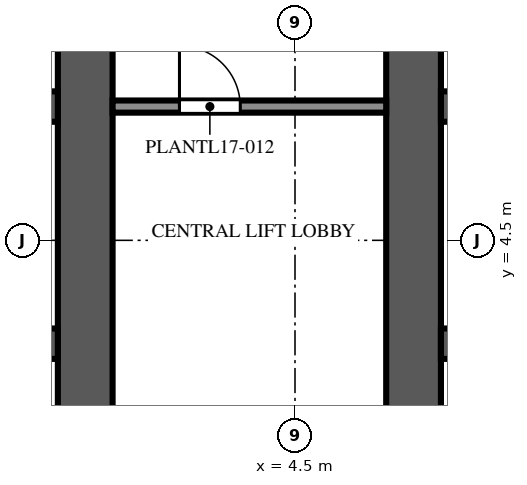
"""IFC4 building model, lengths in metres.
Left out: names, types, materials, properties, quantities, classifications, styles, units other than length and angle.
Written with IfcOpenShell. Run it as: python <this file> out.ifc"""

import sys

from ifc_helpers import new_model, si_unit, direction, frame, frame_2d, origin, place, context, subcontext, project, spatial, rectangle, extrude, element, fill, save


model = new_model("IFC4")
c1 = context("Model", 3, precision=1e-05, world=origin(), true_north=direction((0.0, 1.0)))
c2 = subcontext(c1, "Body", "Model", "MODEL_VIEW")
j1 = project(units=[si_unit("LENGTHUNIT", "METRE"), si_unit("PLANEANGLEUNIT", "RADIAN")], contexts=[c1])
p1 = place(None, origin())
s1 = spatial("IfcSite", under=j1, at=p1, CompositionType="ELEMENT")
p2 = place(p1, origin())
s2 = spatial("IfcBuilding", under=s1, at=p2, CompositionType="ELEMENT")
p3 = place(p2, frame((0.0, 0.0, 76.6)))
s3 = spatial("IfcBuildingStorey", under=s2, at=p3, CompositionType="ELEMENT", Elevation=76.6)
p4 = place(p3, frame((1.05, -9.0, 0.0), z_axis=(0.0, 0.0, 1.0), x_axis=(0.0, 1.0, 0.0)))
e1 = element("IfcWall", 1, at=p4, inside=s3, PredefinedType="SHEAR", context=c2, shape_type="SweptSolid", body=[
    extrude(rectangle(XDim=27.5, YDim=0.9, at=frame_2d((13.75, 0.0))), origin(), (0.0, 0.0, 1.0), 5.4),
])
p5 = place(p4, frame((12.55, 0.0, 0.0)))
e2 = element("IfcOpeningElement", 2, at=p5, cuts=e1, PredefinedType="OPENING", context=c2, shape_type="SweptSolid", body=[
    extrude(rectangle(XDim=2.4, YDim=2.4, at=frame_2d((1.2, 1.2))), frame((0.0, 0.46, 0.0), z_axis=(0.0, -1.0, 0.0), x_axis=(1.0, 0.0, 0.0)), (0.0, 0.0, 1.0), 0.92),
])
p6 = place(p4, frame((5.445, 0.0, 0.0)))
e3 = element("IfcOpeningElement", 3, at=p6, cuts=e1, PredefinedType="OPENING", context=c2, shape_type="SweptSolid", body=[
    extrude(rectangle(XDim=1.2, YDim=2.1, at=frame_2d((0.6, 1.05))), frame((0.0, 0.46, 0.0), z_axis=(0.0, -1.0, 0.0), x_axis=(1.0, 0.0, 0.0)), (0.0, 0.0, 1.0), 0.92),
])
p7 = place(p4, frame((19.485, 0.0, 0.0)))
e4 = element("IfcOpeningElement", 4, at=p7, cuts=e1, PredefinedType="OPENING", context=c2, shape_type="SweptSolid", body=[
    extrude(rectangle(XDim=1.0, YDim=2.1, at=frame_2d((0.5, 1.05))), frame((0.0, 0.46, 0.0), z_axis=(0.0, -1.0, 0.0), x_axis=(1.0, 0.0, 0.0)), (0.0, 0.0, 1.0), 0.92),
])
p8 = place(p4, frame((21.139, 0.0, 0.0)))
e5 = element("IfcOpeningElement", 5, at=p8, cuts=e1, PredefinedType="OPENING", context=c2, shape_type="SweptSolid", body=[
    extrude(rectangle(XDim=1.0, YDim=2.1, at=frame_2d((0.5, 1.05))), frame((0.0, 0.46, 0.0), z_axis=(0.0, -1.0, 0.0), x_axis=(1.0, 0.0, 0.0)), (0.0, 0.0, 1.0), 0.92),
])
p9 = place(p4, frame((23.16, 0.0, 0.0)))
e6 = element("IfcOpeningElement", 6, at=p9, cuts=e1, PredefinedType="OPENING", context=c2, shape_type="SweptSolid", body=[
    extrude(rectangle(XDim=1.0, YDim=2.1, at=frame_2d((0.5, 1.05))), frame((0.0, 0.46, 0.0), z_axis=(0.0, -1.0, 0.0), x_axis=(1.0, 0.0, 0.0)), (0.0, 0.0, 1.0), 0.92),
])
p10 = place(p4, frame((25.181, 0.0, 0.0)))
e7 = element("IfcOpeningElement", 7, at=p10, cuts=e1, PredefinedType="OPENING", context=c2, shape_type="SweptSolid", body=[
    extrude(rectangle(XDim=1.0, YDim=2.1, at=frame_2d((0.5, 1.05))), frame((0.0, 0.46, 0.0), z_axis=(0.0, -1.0, 0.0), x_axis=(1.0, 0.0, 0.0)), (0.0, 0.0, 1.0), 0.92),
])
p11 = place(p3, frame((-9.6, 2.8, 0.0), z_axis=(0.0, 0.0, 1.0), x_axis=(1.0, 0.0, 0.0)))
e8 = element("IfcWall", 8, at=p11, inside=s3, PredefinedType="SHEAR", context=c2, shape_type="SweptSolid", body=[
    extrude(rectangle(XDim=10.2, YDim=0.5, at=frame_2d((5.1, 0.0))), origin(), (0.0, 0.0, 1.0), 5.4),
])
p12 = place(p11, frame((0.562, 0.0, 0.0)))
e9 = element("IfcOpeningElement", 9, at=p12, cuts=e8, PredefinedType="OPENING", context=c2, shape_type="SweptSolid", body=[
    extrude(rectangle(XDim=1.1, YDim=2.1, at=frame_2d((0.55, 1.05))), frame((0.0, 0.26, 0.0), z_axis=(0.0, -1.0, 0.0), x_axis=(1.0, 0.0, 0.0)), (0.0, 0.0, 1.0), 0.52),
])
p13 = place(p11, frame((3.238, 0.0, 0.0)))
e10 = element("IfcOpeningElement", 10, at=p13, cuts=e8, PredefinedType="OPENING", context=c2, shape_type="SweptSolid", body=[
    extrude(rectangle(XDim=1.1, YDim=2.1, at=frame_2d((0.55, 1.05))), frame((0.0, 0.26, 0.0), z_axis=(0.0, -1.0, 0.0), x_axis=(1.0, 0.0, 0.0)), (0.0, 0.0, 1.0), 0.52),
])
p14 = place(p11, frame((8.538, 0.0, 0.0)))
e11 = element("IfcOpeningElement", 11, at=p14, cuts=e8, PredefinedType="OPENING", context=c2, shape_type="SweptSolid", body=[
    extrude(rectangle(XDim=1.1, YDim=2.1, at=frame_2d((0.55, 1.05))), frame((0.0, 0.26, 0.0), z_axis=(0.0, -1.0, 0.0), x_axis=(1.0, 0.0, 0.0)), (0.0, 0.0, 1.0), 0.52),
])
p15 = place(p3, frame((-9.6, 6.7, 0.0), z_axis=(0.0, 0.0, 1.0), x_axis=(1.0, 0.0, 0.0)))
e12 = element("IfcWall", 12, at=p15, inside=s3, PredefinedType="SHEAR", context=c2, shape_type="SweptSolid", body=[
    extrude(rectangle(XDim=10.2, YDim=0.5, at=frame_2d((5.1, 0.0))), origin(), (0.0, 0.0, 1.0), 5.4),
])
p16 = place(p15, frame((0.562, 0.0, 0.0)))
e13 = element("IfcOpeningElement", 13, at=p16, cuts=e12, PredefinedType="OPENING", context=c2, shape_type="SweptSolid", body=[
    extrude(rectangle(XDim=1.1, YDim=2.1, at=frame_2d((0.55, 1.05))), frame((0.0, 0.26, 0.0), z_axis=(0.0, -1.0, 0.0), x_axis=(1.0, 0.0, 0.0)), (0.0, 0.0, 1.0), 0.52),
])
p17 = place(p15, frame((3.288, 0.0, 0.0)))
e14 = element("IfcOpeningElement", 14, at=p17, cuts=e12, PredefinedType="OPENING", context=c2, shape_type="SweptSolid", body=[
    extrude(rectangle(XDim=1.0, YDim=2.1, at=frame_2d((0.5, 1.05))), frame((0.0, 0.26, 0.0), z_axis=(0.0, -1.0, 0.0), x_axis=(1.0, 0.0, 0.0)), (0.0, 0.0, 1.0), 0.52),
])
p18 = place(p15, frame((5.913, 0.0, 0.0)))
e15 = element("IfcOpeningElement", 15, at=p18, cuts=e12, PredefinedType="OPENING", context=c2, shape_type="SweptSolid", body=[
    extrude(rectangle(XDim=1.0, YDim=2.1, at=frame_2d((0.5, 1.05))), frame((0.0, 0.26, 0.0), z_axis=(0.0, -1.0, 0.0), x_axis=(1.0, 0.0, 0.0)), (0.0, 0.0, 1.0), 0.52),
])
p19 = place(p15, frame((8.587, 0.0, 0.0)))
e16 = element("IfcOpeningElement", 16, at=p19, cuts=e12, PredefinedType="OPENING", context=c2, shape_type="SweptSolid", body=[
    extrude(rectangle(XDim=1.0, YDim=2.1, at=frame_2d((0.5, 1.05))), frame((0.0, 0.26, 0.0), z_axis=(0.0, -1.0, 0.0), x_axis=(1.0, 0.0, 0.0)), (0.0, 0.0, 1.0), 0.52),
])
p20 = place(p3, frame((6.45, -9.0, 0.0), z_axis=(0.0, 0.0, 1.0), x_axis=(0.0, 1.0, 0.0)))
e17 = element("IfcWall", 17, at=p20, inside=s3, PredefinedType="SHEAR", context=c2, shape_type="SweptSolid", body=[
    extrude(rectangle(XDim=27.5, YDim=0.9, at=frame_2d((13.75, 0.0))), origin(), (0.0, 0.0, 1.0), 5.4),
])
p21 = place(p20, frame((12.55, 0.0, 0.0)))
e18 = element("IfcOpeningElement", 18, at=p21, cuts=e17, PredefinedType="OPENING", context=c2, shape_type="SweptSolid", body=[
    extrude(rectangle(XDim=2.4, YDim=2.4, at=frame_2d((1.2, 1.2))), frame((0.0, 0.46, 0.0), z_axis=(0.0, -1.0, 0.0), x_axis=(1.0, 0.0, 0.0)), (0.0, 0.0, 1.0), 0.92),
])
p22 = place(p20, frame((5.445, 0.0, 0.0)))
e19 = element("IfcOpeningElement", 19, at=p22, cuts=e17, PredefinedType="OPENING", context=c2, shape_type="SweptSolid", body=[
    extrude(rectangle(XDim=1.2, YDim=2.1, at=frame_2d((0.6, 1.05))), frame((0.0, 0.46, 0.0), z_axis=(0.0, -1.0, 0.0), x_axis=(1.0, 0.0, 0.0)), (0.0, 0.0, 1.0), 0.92),
])
p23 = place(p20, frame((19.485, 0.0, 0.0)))
e20 = element("IfcOpeningElement", 20, at=p23, cuts=e17, PredefinedType="OPENING", context=c2, shape_type="SweptSolid", body=[
    extrude(rectangle(XDim=1.0, YDim=2.1, at=frame_2d((0.5, 1.05))), frame((0.0, 0.46, 0.0), z_axis=(0.0, -1.0, 0.0), x_axis=(1.0, 0.0, 0.0)), (0.0, 0.0, 1.0), 0.92),
])
p24 = place(p20, frame((21.139, 0.0, 0.0)))
e21 = element("IfcOpeningElement", 21, at=p24, cuts=e17, PredefinedType="OPENING", context=c2, shape_type="SweptSolid", body=[
    extrude(rectangle(XDim=1.0, YDim=2.1, at=frame_2d((0.5, 1.05))), frame((0.0, 0.46, 0.0), z_axis=(0.0, -1.0, 0.0), x_axis=(1.0, 0.0, 0.0)), (0.0, 0.0, 1.0), 0.92),
])
p25 = place(p20, frame((23.16, 0.0, 0.0)))
e22 = element("IfcOpeningElement", 22, at=p25, cuts=e17, PredefinedType="OPENING", context=c2, shape_type="SweptSolid", body=[
    extrude(rectangle(XDim=1.0, YDim=2.1, at=frame_2d((0.5, 1.05))), frame((0.0, 0.46, 0.0), z_axis=(0.0, -1.0, 0.0), x_axis=(1.0, 0.0, 0.0)), (0.0, 0.0, 1.0), 0.92),
])
p26 = place(p20, frame((25.181, 0.0, 0.0)))
e23 = element("IfcOpeningElement", 23, at=p26, cuts=e17, PredefinedType="OPENING", context=c2, shape_type="SweptSolid", body=[
    extrude(rectangle(XDim=1.0, YDim=2.1, at=frame_2d((0.5, 1.05))), frame((0.0, 0.46, 0.0), z_axis=(0.0, -1.0, 0.0), x_axis=(1.0, 0.0, 0.0)), (0.0, 0.0, 1.0), 0.92),
])
p27 = place(p3, frame((6.9, 2.8, 0.0), z_axis=(0.0, 0.0, 1.0), x_axis=(1.0, 0.0, 0.0)))
e24 = element("IfcWall", 24, at=p27, inside=s3, PredefinedType="SHEAR", context=c2, shape_type="SweptSolid", body=[
    extrude(rectangle(XDim=10.2, YDim=0.5, at=frame_2d((5.1, 0.0))), origin(), (0.0, 0.0, 1.0), 5.4),
])
p28 = place(p27, frame((0.562, 0.0, 0.0)))
e25 = element("IfcOpeningElement", 25, at=p28, cuts=e24, PredefinedType="OPENING", context=c2, shape_type="SweptSolid", body=[
    extrude(rectangle(XDim=1.1, YDim=2.1, at=frame_2d((0.55, 1.05))), frame((0.0, 0.26, 0.0), z_axis=(0.0, -1.0, 0.0), x_axis=(1.0, 0.0, 0.0)), (0.0, 0.0, 1.0), 0.52),
])
p29 = place(p27, frame((3.238, 0.0, 0.0)))
e26 = element("IfcOpeningElement", 26, at=p29, cuts=e24, PredefinedType="OPENING", context=c2, shape_type="SweptSolid", body=[
    extrude(rectangle(XDim=1.1, YDim=2.1, at=frame_2d((0.55, 1.05))), frame((0.0, 0.26, 0.0), z_axis=(0.0, -1.0, 0.0), x_axis=(1.0, 0.0, 0.0)), (0.0, 0.0, 1.0), 0.52),
])
p30 = place(p27, frame((8.538, 0.0, 0.0)))
e27 = element("IfcOpeningElement", 27, at=p30, cuts=e24, PredefinedType="OPENING", context=c2, shape_type="SweptSolid", body=[
    extrude(rectangle(XDim=1.1, YDim=2.1, at=frame_2d((0.55, 1.05))), frame((0.0, 0.26, 0.0), z_axis=(0.0, -1.0, 0.0), x_axis=(1.0, 0.0, 0.0)), (0.0, 0.0, 1.0), 0.52),
])
p31 = place(p3, frame((6.9, 6.7, 0.0), z_axis=(0.0, 0.0, 1.0), x_axis=(1.0, 0.0, 0.0)))
e28 = element("IfcWall", 28, at=p31, inside=s3, PredefinedType="SHEAR", context=c2, shape_type="SweptSolid", body=[
    extrude(rectangle(XDim=10.2, YDim=0.5, at=frame_2d((5.1, 0.0))), origin(), (0.0, 0.0, 1.0), 5.4),
])
p32 = place(p31, frame((0.562, 0.0, 0.0)))
e29 = element("IfcOpeningElement", 29, at=p32, cuts=e28, PredefinedType="OPENING", context=c2, shape_type="SweptSolid", body=[
    extrude(rectangle(XDim=1.1, YDim=2.1, at=frame_2d((0.55, 1.05))), frame((0.0, 0.26, 0.0), z_axis=(0.0, -1.0, 0.0), x_axis=(1.0, 0.0, 0.0)), (0.0, 0.0, 1.0), 0.52),
])
p33 = place(p31, frame((3.288, 0.0, 0.0)))
e30 = element("IfcOpeningElement", 30, at=p33, cuts=e28, PredefinedType="OPENING", context=c2, shape_type="SweptSolid", body=[
    extrude(rectangle(XDim=1.0, YDim=2.1, at=frame_2d((0.5, 1.05))), frame((0.0, 0.26, 0.0), z_axis=(0.0, -1.0, 0.0), x_axis=(1.0, 0.0, 0.0)), (0.0, 0.0, 1.0), 0.52),
])
p34 = place(p31, frame((5.913, 0.0, 0.0)))
e31 = element("IfcOpeningElement", 31, at=p34, cuts=e28, PredefinedType="OPENING", context=c2, shape_type="SweptSolid", body=[
    extrude(rectangle(XDim=1.0, YDim=2.1, at=frame_2d((0.5, 1.05))), frame((0.0, 0.26, 0.0), z_axis=(0.0, -1.0, 0.0), x_axis=(1.0, 0.0, 0.0)), (0.0, 0.0, 1.0), 0.52),
])
p35 = place(p31, frame((8.587, 0.0, 0.0)))
e32 = element("IfcOpeningElement", 32, at=p35, cuts=e28, PredefinedType="OPENING", context=c2, shape_type="SweptSolid", body=[
    extrude(rectangle(XDim=1.0, YDim=2.1, at=frame_2d((0.5, 1.05))), frame((0.0, 0.26, 0.0), z_axis=(0.0, -1.0, 0.0), x_axis=(1.0, 0.0, 0.0)), (0.0, 0.0, 1.0), 0.52),
])
p36 = place(p3, frame((1.5, 6.7, 0.0), z_axis=(0.0, 0.0, 1.0), x_axis=(1.0, 0.0, 0.0)))
e33 = element("IfcWall", 33, at=p36, inside=s3, PredefinedType="PARTITIONING", context=c2, shape_type="SweptSolid", body=[
    extrude(rectangle(XDim=4.5, YDim=0.2, at=frame_2d((2.25, 0.0))), origin(), (0.0, 0.0, 1.0), 4.95),
])
p37 = place(p36, frame((1.1, 0.0, 0.0)))
e34 = element("IfcOpeningElement", 34, at=p37, cuts=e33, PredefinedType="OPENING", context=c2, shape_type="SweptSolid", body=[
    extrude(rectangle(XDim=1.0, YDim=2.1, at=frame_2d((0.5, 1.05))), frame((0.0, 0.11, 0.0), z_axis=(0.0, -1.0, 0.0), x_axis=(1.0, 0.0, 0.0)), (0.0, 0.0, 1.0), 0.22),
])
p38 = place(p5, origin())
e35 = element("IfcDoor", 35, at=p38, inside=s3, OperationType="DOUBLE_DOOR_DOUBLE_SWING", PredefinedType="DOOR", context=c2, shape_type="SweptSolid", body=[
    extrude(rectangle(XDim=2.4, YDim=2.4, at=frame_2d((1.2, 1.2))), frame((0.0, 0.025, 0.0), z_axis=(0.0, -1.0, 0.0), x_axis=(1.0, 0.0, 0.0)), (0.0, 0.0, 1.0), 0.05),
])
fill(e2, e35)
p39 = place(p21, origin())
e36 = element("IfcDoor", 36, at=p39, inside=s3, OperationType="DOUBLE_DOOR_DOUBLE_SWING", PredefinedType="DOOR", context=c2, shape_type="SweptSolid", body=[
    extrude(rectangle(XDim=2.4, YDim=2.4, at=frame_2d((1.2, 1.2))), frame((0.0, 0.025, 0.0), z_axis=(0.0, -1.0, 0.0), x_axis=(1.0, 0.0, 0.0)), (0.0, 0.0, 1.0), 0.05),
])
fill(e18, e36)
p40 = place(p37, origin())
e37 = element("IfcDoor", 37, at=p40, inside=s3, OperationType="SINGLE_SWING_LEFT", PredefinedType="DOOR", context=c2, shape_type="SweptSolid", body=[
    extrude(rectangle(XDim=1.0, YDim=2.1, at=frame_2d((0.5, 1.05))), frame((0.0, 0.025, 0.0), z_axis=(0.0, -1.0, 0.0), x_axis=(1.0, 0.0, 0.0)), (0.0, 0.0, 1.0), 0.05),
])
fill(e34, e37)
save(model, sys.argv[1])
